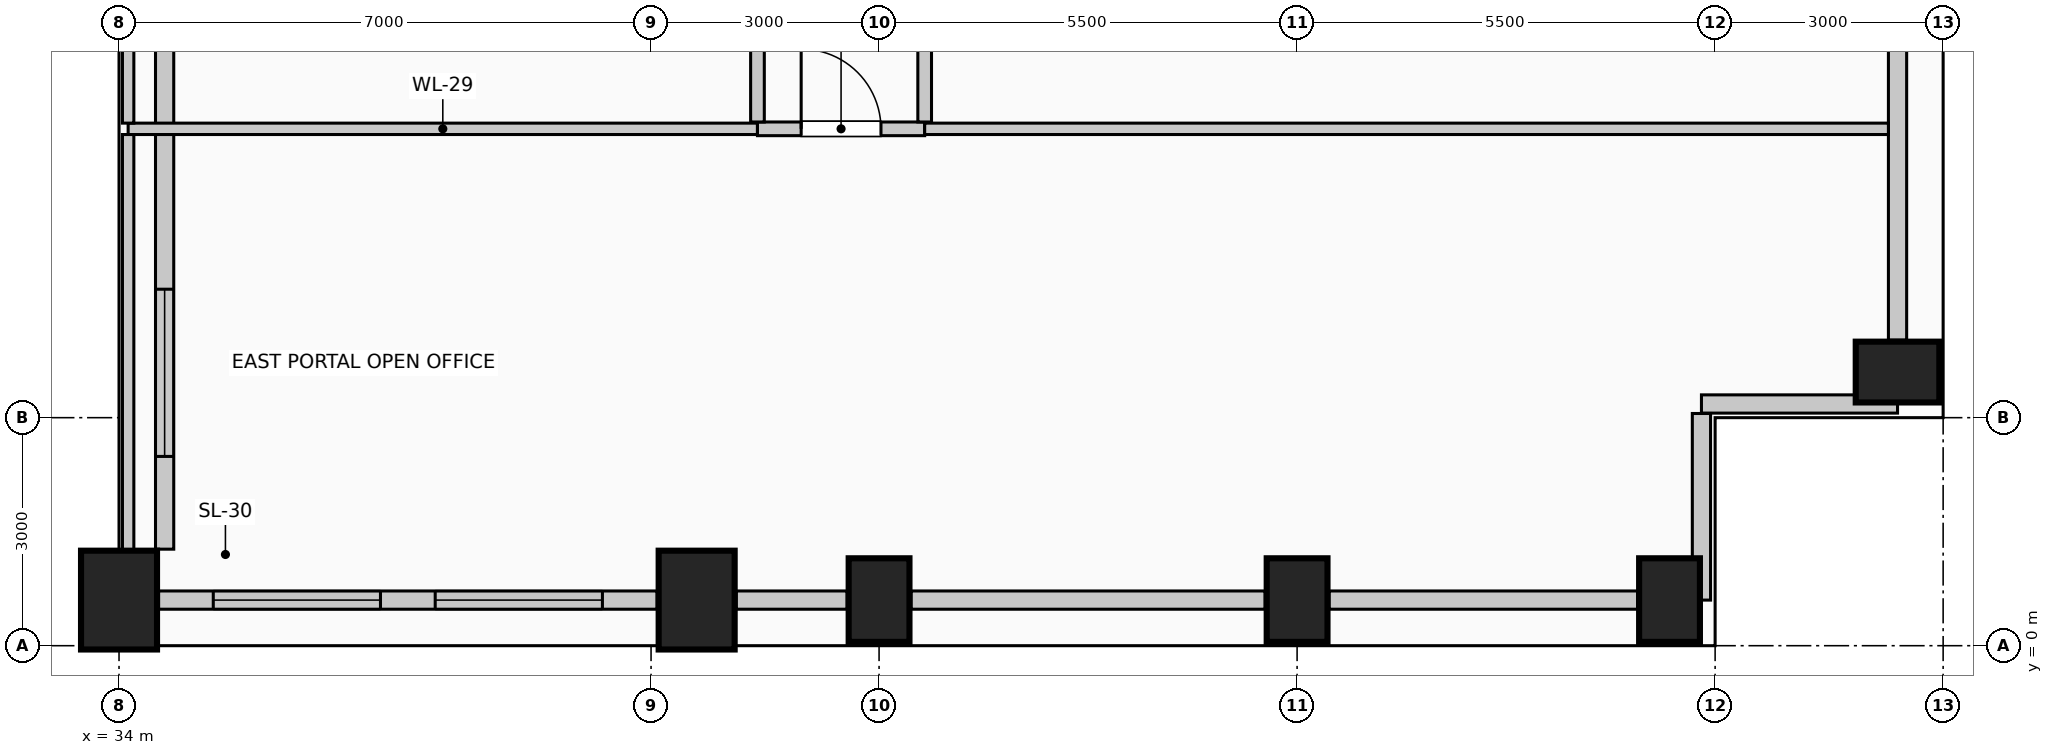
"""IFC4 building model, lengths in metres.
Left out: names, types, materials, properties, quantities, classifications, styles, units other than length and angle.
Written with IfcOpenShell. Run it as: python <this file> out.ifc"""

import sys

from ifc_helpers import new_model, si_unit, direction, frame, frame_2d, origin, origin_2d, place, context, subcontext, project, spatial, rectangle, extrude, element, fill, save


model = new_model("IFC4")
c1 = context("Model", 3, precision=1e-05, world=origin(), true_north=direction((0.0, 1.0)))
c2 = subcontext(c1, "Body", "Model", "MODEL_VIEW")
j1 = project(units=[si_unit("LENGTHUNIT", "METRE"), si_unit("PLANEANGLEUNIT", "RADIAN")], contexts=[c1])
p1 = place(None, origin())
s1 = spatial("IfcSite", under=j1, at=p1, CompositionType="ELEMENT")
p2 = place(p1, origin())
s2 = spatial("IfcBuilding", under=s1, at=p2, CompositionType="ELEMENT")
p3 = place(p2, frame((0.0, 0.0, 186.6)))
s3 = spatial("IfcBuildingStorey", under=s2, at=p3, CompositionType="ELEMENT", Elevation=186.6)
for number, where, z_axis, x_axis in (
    (1, (34.0, 0.6, 0.0), (0.0, 0.0, 1.0), (1.0, 0.0, 0.0)),
    (2, (41.6, 0.6, 0.0), (0.0, 0.0, 1.0), (1.0, 0.0, 0.0)),
):
    element("IfcColumn", number, at=place(p3, frame(where, z_axis=z_axis, x_axis=x_axis)), inside=s3, PredefinedType="COLUMN", context=c2, shape_type="SweptSolid", body=[
        extrude(rectangle(XDim=1.0, YDim=1.3, at=origin_2d()), origin(), (0.0, 0.0, 1.0), 4.0),
    ])
for number, where, z_axis, x_axis in (
    (3, (44.0, 0.6, 0.0), (0.0, 0.0, 1.0), (1.0, 0.0, 0.0)),
    (4, (49.5, 0.6, 0.0), (0.0, 0.0, 1.0), (1.0, 0.0, 0.0)),
    (5, (54.4, 0.6, 0.0), (0.0, 0.0, 1.0), (1.0, 0.0, 0.0)),
    (6, (57.4, 3.6, 0.0), (0.0, 0.0, 1.0), (0.0, 1.0, 0.0)),
):
    element("IfcColumn", number, at=place(p3, frame(where, z_axis=z_axis, x_axis=x_axis)), inside=s3, PredefinedType="COLUMN", context=c2, shape_type="SweptSolid", body=[
        extrude(rectangle(XDim=0.8, YDim=1.1, at=origin_2d()), origin(), (0.0, 0.0, 1.0), 4.0),
    ])
p4 = place(p3, frame((41.08, 0.6, 0.0), z_axis=(0.0, 0.0, 1.0), x_axis=(-1.0, 0.0, 0.0)))
e7 = element("IfcWall", 7, at=p4, inside=s3, PredefinedType="SOLIDWALL", context=c2, shape_type="SweptSolid", body=[
    extrude(rectangle(XDim=6.56, YDim=0.24, at=frame_2d((3.28, 0.0))), origin(), (0.0, 0.0, 1.0), 3.0),
])
p5 = place(p4, frame((0.72, 0.0, 0.42)))
e8 = element("IfcOpeningElement", 8, at=p5, cuts=e7, PredefinedType="OPENING", context=c2, shape_type="SweptSolid", body=[
    extrude(rectangle(XDim=2.2, YDim=1.95, at=frame_2d((1.1, 0.975))), frame((0.0, 0.13, 0.0), z_axis=(0.0, -1.0, 0.0), x_axis=(1.0, 0.0, 0.0)), (0.0, 0.0, 1.0), 0.26),
])
p6 = place(p4, frame((3.64, 0.0, 0.42)))
e9 = element("IfcOpeningElement", 9, at=p6, cuts=e7, PredefinedType="OPENING", context=c2, shape_type="SweptSolid", body=[
    extrude(rectangle(XDim=2.2, YDim=1.95, at=frame_2d((1.1, 0.975))), frame((0.0, 0.13, 0.0), z_axis=(0.0, -1.0, 0.0), x_axis=(1.0, 0.0, 0.0)), (0.0, 0.0, 1.0), 0.26),
])
p7 = place(p3, frame((43.58, 0.6, 0.0), z_axis=(0.0, 0.0, 1.0), x_axis=(-1.0, 0.0, 0.0)))
e10 = element("IfcWall", 10, at=p7, inside=s3, PredefinedType="SOLIDWALL", context=c2, shape_type="SweptSolid", body=[
    extrude(rectangle(XDim=1.46, YDim=0.24, at=frame_2d((0.73, 0.0))), origin(), (0.0, 0.0, 1.0), 3.0),
])
p8 = place(p3, frame((49.08, 0.6, 0.0), z_axis=(0.0, 0.0, 1.0), x_axis=(-1.0, 0.0, 0.0)))
e11 = element("IfcWall", 11, at=p8, inside=s3, PredefinedType="SOLIDWALL", context=c2, shape_type="SweptSolid", body=[
    extrude(rectangle(XDim=4.66, YDim=0.24, at=frame_2d((2.33, 0.0))), origin(), (0.0, 0.0, 1.0), 3.0),
])
p9 = place(p3, frame((53.98, 0.6, 0.0), z_axis=(0.0, 0.0, 1.0), x_axis=(-1.0, 0.0, 0.0)))
e12 = element("IfcWall", 12, at=p9, inside=s3, PredefinedType="SOLIDWALL", context=c2, shape_type="SweptSolid", body=[
    extrude(rectangle(XDim=4.06, YDim=0.24, at=frame_2d((2.03, 0.0))), origin(), (0.0, 0.0, 1.0), 3.0),
])
p10 = place(p3, frame((57.4, 9.58, 0.0), z_axis=(0.0, 0.0, 1.0), x_axis=(0.0, -1.0, 0.0)))
e13 = element("IfcWall", 13, at=p10, inside=s3, PredefinedType="SOLIDWALL", context=c2, shape_type="SweptSolid", body=[
    extrude(rectangle(XDim=5.56, YDim=0.24, at=frame_2d((2.78, 0.0))), origin(), (0.0, 0.0, 1.0), 3.0),
])
p11 = place(p3, frame((57.4, 3.18, 0.0), z_axis=(0.0, 0.0, 1.0), x_axis=(-1.0, 0.0, 0.0)))
e14 = element("IfcWall", 14, at=p11, inside=s3, PredefinedType="SOLIDWALL", context=c2, shape_type="SweptSolid", body=[
    extrude(rectangle(XDim=2.58, YDim=0.24, at=frame_2d((1.29, 0.0))), origin(), (0.0, 0.0, 1.0), 3.75),
])
p12 = place(p3, frame((54.82, 3.055, 0.0), z_axis=(0.0, 0.0, 1.0), x_axis=(0.0, -1.0, 0.0)))
e15 = element("IfcWall", 15, at=p12, inside=s3, PredefinedType="SOLIDWALL", context=c2, shape_type="SweptSolid", body=[
    extrude(rectangle(XDim=2.455, YDim=0.24, at=frame_2d((1.228, 0.0))), origin(), (0.0, 0.0, 1.0), 3.75),
])
p13 = place(p3, frame((34.6, 1.27, 0.0), z_axis=(0.0, 0.0, 1.0), x_axis=(0.0, 1.0, 0.0)))
e16 = element("IfcWall", 16, at=p13, inside=s3, PredefinedType="SOLIDWALL", context=c2, shape_type="SweptSolid", body=[
    extrude(rectangle(XDim=8.06, YDim=0.24, at=frame_2d((4.03, 0.0))), origin(), (0.0, 0.0, 1.0), 3.75),
])
p14 = place(p13, frame((1.22, 0.0, 0.42)))
e17 = element("IfcOpeningElement", 17, at=p14, cuts=e16, PredefinedType="OPENING", context=c2, shape_type="SweptSolid", body=[
    extrude(rectangle(XDim=2.2, YDim=1.95, at=frame_2d((1.1, 0.975))), frame((0.0, 0.13, 0.0), z_axis=(0.0, -1.0, 0.0), x_axis=(1.0, 0.0, 0.0)), (0.0, 0.0, 1.0), 0.26),
])
p15 = place(p3, frame((34.12, 6.8, 0.0), z_axis=(0.0, 0.0, 1.0), x_axis=(1.0, 0.0, 0.0)))
e18 = element("IfcWall", 18, at=p15, inside=s3, PredefinedType="PARTITIONING", context=c2, shape_type="SweptSolid", body=[
    extrude(rectangle(XDim=8.28, YDim=0.15, at=frame_2d((4.14, 0.0))), origin(), (0.0, 0.0, 1.0), 3.245),
])
p16 = place(p3, frame((42.4, 6.8, 0.0), z_axis=(0.0, 0.0, 1.0), x_axis=(1.0, 0.0, 0.0)))
e19 = element("IfcWall", 19, at=p16, inside=s3, PredefinedType="PARTITIONING", context=c2, shape_type="SweptSolid", body=[
    extrude(rectangle(XDim=2.2, YDim=0.18, at=frame_2d((1.1, 0.0))), origin(), (0.0, 0.0, 1.0), 3.245),
])
p17 = place(p16, frame((0.575, 0.0, 0.0)))
e20 = element("IfcOpeningElement", 20, at=p17, cuts=e19, PredefinedType="OPENING", context=c2, shape_type="SweptSolid", body=[
    extrude(rectangle(XDim=1.05, YDim=2.15, at=frame_2d((0.525, 1.075))), frame((0.0, 0.1, 0.0), z_axis=(0.0, -1.0, 0.0), x_axis=(1.0, 0.0, 0.0)), (0.0, 0.0, 1.0), 0.2),
])
p18 = place(p3, frame((44.6, 6.8, 0.0), z_axis=(0.0, 0.0, 1.0), x_axis=(1.0, 0.0, 0.0)))
e21 = element("IfcWall", 21, at=p18, inside=s3, PredefinedType="PARTITIONING", context=c2, shape_type="SweptSolid", body=[
    extrude(rectangle(XDim=12.68, YDim=0.15, at=frame_2d((6.34, 0.0))), origin(), (0.0, 0.0, 1.0), 3.245),
])
p19 = place(p3, frame((34.12, 1.25, 0.0), z_axis=(0.0, 0.0, 1.0), x_axis=(0.0, 1.0, 0.0)))
e22 = element("IfcWall", 22, at=p19, inside=s3, PredefinedType="PARTITIONING", context=c2, shape_type="SweptSolid", body=[
    extrude(rectangle(XDim=5.475, YDim=0.15, at=frame_2d((2.738, 0.0))), origin(), (0.0, 0.0, 1.0), 3.145),
])
p20 = place(p3, frame((34.12, 6.875, 0.0), z_axis=(0.0, 0.0, 1.0), x_axis=(0.0, 1.0, 0.0)))
e23 = element("IfcWall", 23, at=p20, inside=s3, PredefinedType="PARTITIONING", context=c2, shape_type="SweptSolid", body=[
    extrude(rectangle(XDim=2.475, YDim=0.15, at=frame_2d((1.238, 0.0))), origin(), (0.0, 0.0, 1.0), 3.145),
])
p21 = place(p3, frame((42.4, 6.89, 0.0), z_axis=(0.0, 0.0, 1.0), x_axis=(0.0, 1.0, 0.0)))
e24 = element("IfcWall", 24, at=p21, inside=s3, PredefinedType="PARTITIONING", context=c2, shape_type="SweptSolid", body=[
    extrude(rectangle(XDim=25.385, YDim=0.18, at=frame_2d((12.692, 0.0))), origin(), (0.0, 0.0, 1.0), 3.75),
])
p22 = place(p21, frame((12.938, 0.0, 0.0)))
e25 = element("IfcOpeningElement", 25, at=p22, cuts=e24, PredefinedType="OPENING", context=c2, shape_type="SweptSolid", body=[
    extrude(rectangle(XDim=0.95, YDim=2.15, at=frame_2d((0.475, 1.075))), frame((0.0, 0.1, 0.0), z_axis=(0.0, -1.0, 0.0), x_axis=(1.0, 0.0, 0.0)), (0.0, 0.0, 1.0), 0.2),
])
p23 = place(p3, frame((44.6, 6.89, 0.0), z_axis=(0.0, 0.0, 1.0), x_axis=(0.0, 1.0, 0.0)))
e26 = element("IfcWall", 26, at=p23, inside=s3, PredefinedType="PARTITIONING", context=c2, shape_type="SweptSolid", body=[
    extrude(rectangle(XDim=9.035, YDim=0.18, at=frame_2d((4.518, 0.0))), origin(), (0.0, 0.0, 1.0), 3.75),
])
p24 = place(p23, frame((3.992, 0.0, 0.0)))
e27 = element("IfcOpeningElement", 27, at=p24, cuts=e26, PredefinedType="OPENING", context=c2, shape_type="SweptSolid", body=[
    extrude(rectangle(XDim=1.05, YDim=2.15, at=frame_2d((0.525, 1.075))), frame((0.0, 0.1, 0.0), z_axis=(0.0, -1.0, 0.0), x_axis=(1.0, 0.0, 0.0)), (0.0, 0.0, 1.0), 0.2),
])
p25 = place(p5, origin())
e28 = element("IfcWindow", 28, at=p25, inside=s3, PartitioningType="SINGLE_PANEL", PredefinedType="WINDOW", context=c2, shape_type="SweptSolid", body=[
    extrude(rectangle(XDim=2.2, YDim=1.95, at=frame_2d((1.1, 0.975))), frame((0.0, 0.03, 0.0), z_axis=(0.0, -1.0, 0.0), x_axis=(1.0, 0.0, 0.0)), (0.0, 0.0, 1.0), 0.06),
])
fill(e8, e28)
p26 = place(p6, origin())
e29 = element("IfcWindow", 29, at=p26, inside=s3, PartitioningType="SINGLE_PANEL", PredefinedType="WINDOW", context=c2, shape_type="SweptSolid", body=[
    extrude(rectangle(XDim=2.2, YDim=1.95, at=frame_2d((1.1, 0.975))), frame((0.0, 0.03, 0.0), z_axis=(0.0, -1.0, 0.0), x_axis=(1.0, 0.0, 0.0)), (0.0, 0.0, 1.0), 0.06),
])
fill(e9, e29)
p27 = place(p14, origin())
e30 = element("IfcWindow", 30, at=p27, inside=s3, PartitioningType="SINGLE_PANEL", PredefinedType="WINDOW", context=c2, shape_type="SweptSolid", body=[
    extrude(rectangle(XDim=2.2, YDim=1.95, at=frame_2d((1.1, 0.975))), frame((0.0, 0.03, 0.0), z_axis=(0.0, -1.0, 0.0), x_axis=(1.0, 0.0, 0.0)), (0.0, 0.0, 1.0), 0.06),
])
fill(e17, e30)
p28 = place(p17, origin())
e31 = element("IfcDoor", 31, at=p28, inside=s3, OperationType="SINGLE_SWING_LEFT", PredefinedType="DOOR", context=c2, shape_type="SweptSolid", body=[
    extrude(rectangle(XDim=1.05, YDim=2.15, at=frame_2d((0.525, 1.075))), frame((0.0, 0.025, 0.0), z_axis=(0.0, -1.0, 0.0), x_axis=(1.0, 0.0, 0.0)), (0.0, 0.0, 1.0), 0.05),
])
fill(e20, e31)
save(model, sys.argv[1])
